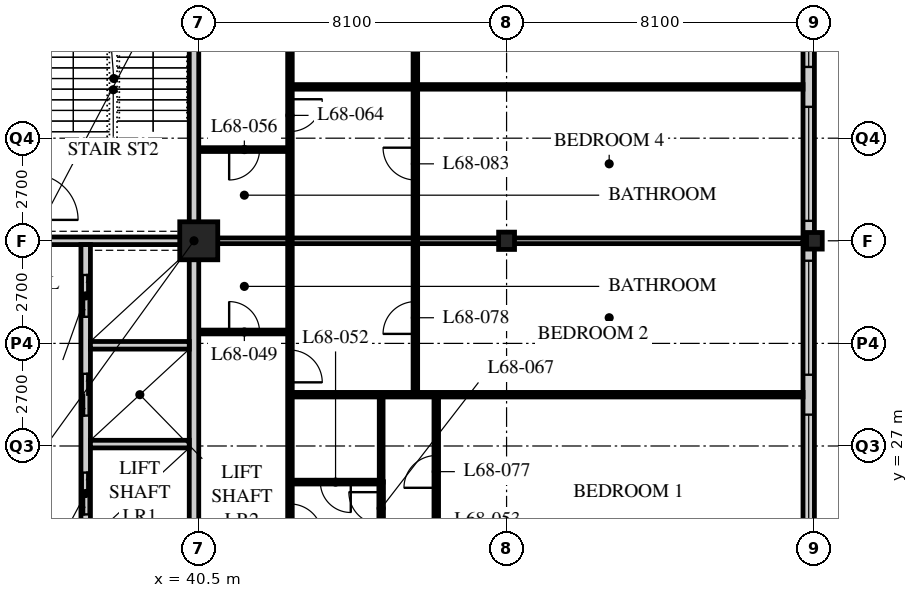
"""IFC4 building model, lengths in metres.
Left out: names, types, materials, properties, quantities, classifications, styles, units other than length and angle.
Written with IfcOpenShell. Run it as: python <this file> out.ifc"""

import sys

from ifc_helpers import new_model, si_unit, direction, frame, frame_2d, origin, origin_2d, place, context, subcontext, project, spatial, rectangle, hollow_rectangle, i_section, extrude, element, fill, save


model = new_model("IFC4")
c1 = context("Model", 3, precision=1e-05, world=origin(), true_north=direction((0.0, 1.0)))
c2 = subcontext(c1, "Body", "Model", "MODEL_VIEW")
j1 = project(units=[si_unit("LENGTHUNIT", "METRE"), si_unit("PLANEANGLEUNIT", "RADIAN")], contexts=[c1])
p1 = place(None, origin())
s1 = spatial("IfcSite", under=j1, at=p1, CompositionType="ELEMENT")
p2 = place(p1, origin())
s2 = spatial("IfcBuilding", under=s1, at=p2, CompositionType="ELEMENT")
p3 = place(p2, frame((0.0, 0.0, 265.8)))
s3 = spatial("IfcBuildingStorey", under=s2, at=p3, CompositionType="ELEMENT", Elevation=265.8)
p4 = place(p3, frame((40.5, 32.4, 0.0), z_axis=(0.0, 0.0, 1.0), x_axis=(1.0, 0.0, 0.0)))
e1 = element("IfcColumn", 1, at=p4, inside=s3, PredefinedType="COLUMN", context=c2, shape_type="SweptSolid", body=[
    extrude(hollow_rectangle(XDim=1.0, YDim=1.0, WallThickness=0.1, at=origin_2d()), origin(), (0.0, 0.0, 1.0), 3.9),
])
p5 = place(p3, frame((48.6, 32.4, 0.0), z_axis=(0.0, 0.0, 1.0), x_axis=(1.0, 0.0, 0.0)))
e2 = element("IfcColumn", 2, at=p5, inside=s3, PredefinedType="COLUMN", context=c2, shape_type="SweptSolid", body=[
    extrude(i_section(OverallWidth=0.418, OverallDepth=0.456, WebThickness=0.042, FlangeThickness=0.067, FilletRadius=0.015, at=origin_2d()), origin(), (0.0, 0.0, 1.0), 3.9),
])
p6 = place(p3, frame((56.7, 32.4, 0.0), z_axis=(0.0, 0.0, 1.0), x_axis=(1.0, 0.0, 0.0)))
e3 = element("IfcColumn", 3, at=p6, inside=s3, PredefinedType="COLUMN", context=c2, shape_type="SweptSolid", body=[
    extrude(i_section(OverallWidth=0.412, OverallDepth=0.437, WebThickness=0.036, FlangeThickness=0.058, FilletRadius=0.015, at=origin_2d()), origin(), (0.0, 0.0, 1.0), 3.9),
])
p7 = place(p3, frame((56.55, 24.6, 0.0), z_axis=(0.0, 0.0, 1.0), x_axis=(0.0, 1.0, 0.0)))
e4 = element("IfcWall", 4, at=p7, inside=s3, PredefinedType="SOLIDWALL", context=c2, shape_type="SweptSolid", body=[
    extrude(rectangle(XDim=32.1, YDim=0.3, at=frame_2d((16.05, 0.0))), origin(), (0.0, 0.0, 1.0), 3.69),
])
p8 = place(p7, frame((0.225, 0.0, 0.6)))
e5 = element("IfcOpeningElement", 5, at=p8, cuts=e4, PredefinedType="OPENING", context=c2, shape_type="SweptSolid", body=[
    extrude(rectangle(XDim=3.0, YDim=2.4, at=frame_2d((1.5, 1.2))), frame((0.0, 0.16, 0.0), z_axis=(0.0, -1.0, 0.0), x_axis=(1.0, 0.0, 0.0)), (0.0, 0.0, 1.0), 0.32),
])
p9 = place(p7, frame((4.275, 0.0, 0.6)))
e6 = element("IfcOpeningElement", 6, at=p9, cuts=e4, PredefinedType="OPENING", context=c2, shape_type="SweptSolid", body=[
    extrude(rectangle(XDim=3.0, YDim=2.4, at=frame_2d((1.5, 1.2))), frame((0.0, 0.16, 0.0), z_axis=(0.0, -1.0, 0.0), x_axis=(1.0, 0.0, 0.0)), (0.0, 0.0, 1.0), 0.32),
])
p10 = place(p7, frame((8.325, 0.0, 0.6)))
e7 = element("IfcOpeningElement", 7, at=p10, cuts=e4, PredefinedType="OPENING", context=c2, shape_type="SweptSolid", body=[
    extrude(rectangle(XDim=3.0, YDim=2.4, at=frame_2d((1.5, 1.2))), frame((0.0, 0.16, 0.0), z_axis=(0.0, -1.0, 0.0), x_axis=(1.0, 0.0, 0.0)), (0.0, 0.0, 1.0), 0.32),
])
p11 = place(p7, frame((12.375, 0.0, 0.6)))
e8 = element("IfcOpeningElement", 8, at=p11, cuts=e4, PredefinedType="OPENING", context=c2, shape_type="SweptSolid", body=[
    extrude(rectangle(XDim=3.0, YDim=2.4, at=frame_2d((1.5, 1.2))), frame((0.0, 0.16, 0.0), z_axis=(0.0, -1.0, 0.0), x_axis=(1.0, 0.0, 0.0)), (0.0, 0.0, 1.0), 0.32),
])
p12 = place(p7, frame((16.425, 0.0, 0.6)))
e9 = element("IfcOpeningElement", 9, at=p12, cuts=e4, PredefinedType="OPENING", context=c2, shape_type="SweptSolid", body=[
    extrude(rectangle(XDim=3.0, YDim=2.4, at=frame_2d((1.5, 1.2))), frame((0.0, 0.16, 0.0), z_axis=(0.0, -1.0, 0.0), x_axis=(1.0, 0.0, 0.0)), (0.0, 0.0, 1.0), 0.32),
])
p13 = place(p7, frame((20.475, 0.0, 0.6)))
e10 = element("IfcOpeningElement", 10, at=p13, cuts=e4, PredefinedType="OPENING", context=c2, shape_type="SweptSolid", body=[
    extrude(rectangle(XDim=3.0, YDim=2.4, at=frame_2d((1.5, 1.2))), frame((0.0, 0.16, 0.0), z_axis=(0.0, -1.0, 0.0), x_axis=(1.0, 0.0, 0.0)), (0.0, 0.0, 1.0), 0.32),
])
p14 = place(p7, frame((24.525, 0.0, 0.6)))
e11 = element("IfcOpeningElement", 11, at=p14, cuts=e4, PredefinedType="OPENING", context=c2, shape_type="SweptSolid", body=[
    extrude(rectangle(XDim=3.0, YDim=2.4, at=frame_2d((1.5, 1.2))), frame((0.0, 0.16, 0.0), z_axis=(0.0, -1.0, 0.0), x_axis=(1.0, 0.0, 0.0)), (0.0, 0.0, 1.0), 0.32),
])
p15 = place(p7, frame((28.575, 0.0, 0.6)))
e12 = element("IfcOpeningElement", 12, at=p15, cuts=e4, PredefinedType="OPENING", context=c2, shape_type="SweptSolid", body=[
    extrude(rectangle(XDim=3.0, YDim=2.4, at=frame_2d((1.5, 1.2))), frame((0.0, 0.16, 0.0), z_axis=(0.0, -1.0, 0.0), x_axis=(1.0, 0.0, 0.0)), (0.0, 0.0, 1.0), 0.32),
])
p16 = place(p3, frame((40.5, 30.0, 0.0), z_axis=(0.0, 0.0, 1.0), x_axis=(1.0, 0.0, 0.0)))
e13 = element("IfcWall", 13, at=p16, inside=s3, PredefinedType="PARTITIONING", context=c2, shape_type="SweptSolid", body=[
    extrude(rectangle(XDim=2.4, YDim=0.1, at=frame_2d((1.2, 0.0))), origin(), (0.0, 0.0, 1.0), 3.69),
])
p17 = place(p16, frame((0.8, 0.0, 0.0)))
e14 = element("IfcOpeningElement", 14, at=p17, cuts=e13, PredefinedType="OPENING", context=c2, shape_type="SweptSolid", body=[
    extrude(rectangle(XDim=0.8, YDim=2.1, at=frame_2d((0.4, 1.05))), frame((0.0, 0.06, 0.0), z_axis=(0.0, -1.0, 0.0), x_axis=(1.0, 0.0, 0.0)), (0.0, 0.0, 1.0), 0.12),
])
p18 = place(p3, frame((42.9, 22.5, 0.0), z_axis=(0.0, 0.0, 1.0), x_axis=(0.0, 1.0, 0.0)))
e15 = element("IfcWall", 15, at=p18, inside=s3, PredefinedType="PARTITIONING", context=c2, shape_type="SweptSolid", body=[
    extrude(rectangle(XDim=9.9, YDim=0.12, at=frame_2d((4.95, 0.0))), origin(), (0.0, 0.0, 1.0), 3.69),
])
p19 = place(p18, frame((2.125, 0.0, 0.0)))
e16 = element("IfcOpeningElement", 16, at=p19, cuts=e15, PredefinedType="OPENING", context=c2, shape_type="SweptSolid", body=[
    extrude(rectangle(XDim=0.85, YDim=2.1, at=frame_2d((0.425, 1.05))), frame((0.0, 0.07, 0.0), z_axis=(0.0, -1.0, 0.0), x_axis=(1.0, 0.0, 0.0)), (0.0, 0.0, 1.0), 0.14),
])
p20 = place(p18, frame((6.175, 0.0, 0.0)))
e17 = element("IfcOpeningElement", 17, at=p20, cuts=e15, PredefinedType="OPENING", context=c2, shape_type="SweptSolid", body=[
    extrude(rectangle(XDim=0.85, YDim=2.1, at=frame_2d((0.425, 1.05))), frame((0.0, 0.07, 0.0), z_axis=(0.0, -1.0, 0.0), x_axis=(1.0, 0.0, 0.0)), (0.0, 0.0, 1.0), 0.14),
])
p21 = place(p3, frame((40.5, 32.4, 0.0), z_axis=(0.0, 0.0, 1.0), x_axis=(1.0, 0.0, 0.0)))
e18 = element("IfcWall", 18, at=p21, inside=s3, PredefinedType="PARTITIONING", context=c2, shape_type="SweptSolid", body=[
    extrude(rectangle(XDim=15.9, YDim=0.15, at=frame_2d((7.95, 0.0))), origin(), (0.0, 0.0, 1.0), 3.078),
])
p22 = place(p3, frame((42.9, 26.05, 0.0), z_axis=(0.0, 0.0, 1.0), x_axis=(1.0, 0.0, 0.0)))
e19 = element("IfcWall", 19, at=p22, inside=s3, PredefinedType="PARTITIONING", context=c2, shape_type="SweptSolid", body=[
    extrude(rectangle(XDim=2.4, YDim=0.1, at=frame_2d((1.2, 0.0))), origin(), (0.0, 0.0, 1.0), 3.69),
])
p23 = place(p22, frame((0.8, 0.0, 0.0)))
e20 = element("IfcOpeningElement", 20, at=p23, cuts=e19, PredefinedType="OPENING", context=c2, shape_type="SweptSolid", body=[
    extrude(rectangle(XDim=0.8, YDim=2.1, at=frame_2d((0.4, 1.05))), frame((0.0, 0.06, 0.0), z_axis=(0.0, -1.0, 0.0), x_axis=(1.0, 0.0, 0.0)), (0.0, 0.0, 1.0), 0.12),
])
p24 = place(p3, frame((45.3, 26.05, 0.0), z_axis=(0.0, 0.0, 1.0), x_axis=(0.0, 1.0, 0.0)))
e21 = element("IfcWall", 21, at=p24, inside=s3, PredefinedType="PARTITIONING", context=c2, shape_type="SweptSolid", body=[
    extrude(rectangle(XDim=2.3, YDim=0.1, at=frame_2d((1.15, 0.0))), origin(), (0.0, 0.0, 1.0), 3.69),
])
p25 = place(p3, frame((42.9, 28.35, 0.0), z_axis=(0.0, 0.0, 1.0), x_axis=(1.0, 0.0, 0.0)))
e22 = element("IfcWall", 22, at=p25, inside=s3, PredefinedType="PARTITIONING", context=c2, shape_type="SweptSolid", body=[
    extrude(rectangle(XDim=13.5, YDim=0.12, at=frame_2d((6.75, 0.0))), origin(), (0.0, 0.0, 1.0), 3.69),
])
p26 = place(p3, frame((40.5, 34.8, 0.0), z_axis=(0.0, 0.0, 1.0), x_axis=(1.0, 0.0, 0.0)))
e23 = element("IfcWall", 23, at=p26, inside=s3, PredefinedType="PARTITIONING", context=c2, shape_type="SweptSolid", body=[
    extrude(rectangle(XDim=2.4, YDim=0.1, at=frame_2d((1.2, 0.0))), origin(), (0.0, 0.0, 1.0), 3.69),
])
p27 = place(p26, frame((0.8, 0.0, 0.0)))
e24 = element("IfcOpeningElement", 24, at=p27, cuts=e23, PredefinedType="OPENING", context=c2, shape_type="SweptSolid", body=[
    extrude(rectangle(XDim=0.8, YDim=2.1, at=frame_2d((0.4, 1.05))), frame((0.0, 0.06, 0.0), z_axis=(0.0, -1.0, 0.0), x_axis=(1.0, 0.0, 0.0)), (0.0, 0.0, 1.0), 0.12),
])
p28 = place(p3, frame((42.9, 48.6, 0.0), z_axis=(0.0, 0.0, 1.0), x_axis=(0.0, -1.0, 0.0)))
e25 = element("IfcWall", 25, at=p28, inside=s3, PredefinedType="PARTITIONING", context=c2, shape_type="SweptSolid", body=[
    extrude(rectangle(XDim=16.2, YDim=0.12, at=frame_2d((8.1, 0.0))), origin(), (0.0, 0.0, 1.0), 3.69),
])
p29 = place(p28, frame((2.125, 0.0, 0.0)))
e26 = element("IfcOpeningElement", 26, at=p29, cuts=e25, PredefinedType="OPENING", context=c2, shape_type="SweptSolid", body=[
    extrude(rectangle(XDim=0.85, YDim=2.1, at=frame_2d((0.425, 1.05))), frame((0.0, 0.07, 0.0), z_axis=(0.0, -1.0, 0.0), x_axis=(1.0, 0.0, 0.0)), (0.0, 0.0, 1.0), 0.14),
])
p30 = place(p28, frame((8.425, 0.0, 0.0)))
e27 = element("IfcOpeningElement", 27, at=p30, cuts=e25, PredefinedType="OPENING", context=c2, shape_type="SweptSolid", body=[
    extrude(rectangle(XDim=0.85, YDim=2.1, at=frame_2d((0.425, 1.05))), frame((0.0, 0.07, 0.0), z_axis=(0.0, -1.0, 0.0), x_axis=(1.0, 0.0, 0.0)), (0.0, 0.0, 1.0), 0.14),
])
p31 = place(p28, frame((12.475, 0.0, 0.0)))
e28 = element("IfcOpeningElement", 28, at=p31, cuts=e25, PredefinedType="OPENING", context=c2, shape_type="SweptSolid", body=[
    extrude(rectangle(XDim=0.85, YDim=2.1, at=frame_2d((0.425, 1.05))), frame((0.0, 0.07, 0.0), z_axis=(0.0, -1.0, 0.0), x_axis=(1.0, 0.0, 0.0)), (0.0, 0.0, 1.0), 0.14),
])
p32 = place(p3, frame((42.9, 36.45, 0.0), z_axis=(0.0, 0.0, 1.0), x_axis=(1.0, 0.0, 0.0)))
e29 = element("IfcWall", 29, at=p32, inside=s3, PredefinedType="PARTITIONING", context=c2, shape_type="SweptSolid", body=[
    extrude(rectangle(XDim=13.5, YDim=0.12, at=frame_2d((6.75, 0.0))), origin(), (0.0, 0.0, 1.0), 3.69),
])
p33 = place(p3, frame((45.3, 24.3, 0.0), z_axis=(0.0, 0.0, 1.0), x_axis=(0.0, 1.0, 0.0)))
e30 = element("IfcWall", 30, at=p33, inside=s3, PredefinedType="PARTITIONING", context=c2, shape_type="SweptSolid", body=[
    extrude(rectangle(XDim=1.76, YDim=0.12, at=frame_2d((0.88, 0.0))), origin(), (0.0, 0.0, 1.0), 3.69),
])
p34 = place(p33, frame((0.635, 0.0, 0.0)))
e31 = element("IfcOpeningElement", 31, at=p34, cuts=e30, PredefinedType="OPENING", context=c2, shape_type="SweptSolid", body=[
    extrude(rectangle(XDim=0.85, YDim=2.1, at=frame_2d((0.425, 1.05))), frame((0.0, 0.07, 0.0), z_axis=(0.0, -1.0, 0.0), x_axis=(1.0, 0.0, 0.0)), (0.0, 0.0, 1.0), 0.14),
])
p35 = place(p3, frame((46.75, 24.3, 0.0), z_axis=(0.0, 0.0, 1.0), x_axis=(0.0, 1.0, 0.0)))
e32 = element("IfcWall", 32, at=p35, inside=s3, PredefinedType="PARTITIONING", context=c2, shape_type="SweptSolid", body=[
    extrude(rectangle(XDim=4.05, YDim=0.12, at=frame_2d((2.025, 0.0))), origin(), (0.0, 0.0, 1.0), 3.69),
])
p36 = place(p35, frame((1.6, 0.0, 0.0)))
e33 = element("IfcOpeningElement", 33, at=p36, cuts=e32, PredefinedType="OPENING", context=c2, shape_type="SweptSolid", body=[
    extrude(rectangle(XDim=0.85, YDim=2.1, at=frame_2d((0.425, 1.05))), frame((0.0, 0.07, 0.0), z_axis=(0.0, -1.0, 0.0), x_axis=(1.0, 0.0, 0.0)), (0.0, 0.0, 1.0), 0.14),
])
p37 = place(p3, frame((46.2, 28.35, 0.0), z_axis=(0.0, 0.0, 1.0), x_axis=(0.0, 1.0, 0.0)))
e34 = element("IfcWall", 34, at=p37, inside=s3, PredefinedType="PARTITIONING", context=c2, shape_type="SweptSolid", body=[
    extrude(rectangle(XDim=12.15, YDim=0.12, at=frame_2d((6.075, 0.0))), origin(), (0.0, 0.0, 1.0), 3.69),
])
p38 = place(p37, frame((1.6, 0.0, 0.0)))
e35 = element("IfcOpeningElement", 35, at=p38, cuts=e34, PredefinedType="OPENING", context=c2, shape_type="SweptSolid", body=[
    extrude(rectangle(XDim=0.85, YDim=2.1, at=frame_2d((0.425, 1.05))), frame((0.0, 0.07, 0.0), z_axis=(0.0, -1.0, 0.0), x_axis=(1.0, 0.0, 0.0)), (0.0, 0.0, 1.0), 0.14),
])
p39 = place(p37, frame((9.7, 0.0, 0.0)))
e36 = element("IfcOpeningElement", 36, at=p39, cuts=e34, PredefinedType="OPENING", context=c2, shape_type="SweptSolid", body=[
    extrude(rectangle(XDim=0.85, YDim=2.1, at=frame_2d((0.425, 1.05))), frame((0.0, 0.07, 0.0), z_axis=(0.0, -1.0, 0.0), x_axis=(1.0, 0.0, 0.0)), (0.0, 0.0, 1.0), 0.14),
])
p40 = place(p37, frame((5.65, 0.0, 0.0)))
e37 = element("IfcOpeningElement", 37, at=p40, cuts=e34, PredefinedType="OPENING", context=c2, shape_type="SweptSolid", body=[
    extrude(rectangle(XDim=0.85, YDim=2.1, at=frame_2d((0.425, 1.05))), frame((0.0, 0.07, 0.0), z_axis=(0.0, -1.0, 0.0), x_axis=(1.0, 0.0, 0.0)), (0.0, 0.0, 1.0), 0.14),
])
p41 = place(p3, frame((40.375, 24.55, 0.0), z_axis=(0.0, 0.0, 1.0), x_axis=(0.0, 1.0, 0.0)))
e38 = element("IfcWall", 38, at=p41, inside=s3, PredefinedType="SOLIDWALL", context=c2, shape_type="SweptSolid", body=[
    extrude(rectangle(XDim=15.7, YDim=0.25, at=frame_2d((7.85, 0.0))), origin(), (0.0, 0.0, 1.0), 3.078),
])
p42 = place(p3, frame((32.3, 32.4, 0.0), z_axis=(0.0, 0.0, 1.0), x_axis=(1.0, 0.0, 0.0)))
e39 = element("IfcWall", 39, at=p42, inside=s3, PredefinedType="SOLIDWALL", context=c2, shape_type="SweptSolid", body=[
    extrude(rectangle(XDim=7.95, YDim=0.2, at=frame_2d((3.975, 0.0))), origin(), (0.0, 0.0, 1.0), 3.078),
])
p43 = place(p3, frame((37.525, 24.55, 0.0), z_axis=(0.0, 0.0, 1.0), x_axis=(0.0, 1.0, 0.0)))
e40 = element("IfcWall", 40, at=p43, inside=s3, PredefinedType="SOLIDWALL", context=c2, shape_type="SweptSolid", body=[
    extrude(rectangle(XDim=7.75, YDim=0.25, at=frame_2d((3.875, 0.0))), origin(), (0.0, 0.0, 1.0), 3.69),
])
p44 = place(p43, frame((0.65, 0.0, 0.0)))
e41 = element("IfcOpeningElement", 41, at=p44, cuts=e40, PredefinedType="OPENING", context=c2, shape_type="SweptSolid", body=[
    extrude(rectangle(XDim=1.1, YDim=2.4, at=frame_2d((0.55, 1.2))), frame((0.0, 0.135, 0.0), z_axis=(0.0, -1.0, 0.0), x_axis=(1.0, 0.0, 0.0)), (0.0, 0.0, 1.0), 0.27),
])
p45 = place(p43, frame((3.25, 0.0, 0.0)))
e42 = element("IfcOpeningElement", 42, at=p45, cuts=e40, PredefinedType="OPENING", context=c2, shape_type="SweptSolid", body=[
    extrude(rectangle(XDim=1.1, YDim=2.4, at=frame_2d((0.55, 1.2))), frame((0.0, 0.135, 0.0), z_axis=(0.0, -1.0, 0.0), x_axis=(1.0, 0.0, 0.0)), (0.0, 0.0, 1.0), 0.27),
])
p46 = place(p43, frame((5.85, 0.0, 0.0)))
e43 = element("IfcOpeningElement", 43, at=p46, cuts=e40, PredefinedType="OPENING", context=c2, shape_type="SweptSolid", body=[
    extrude(rectangle(XDim=1.1, YDim=2.4, at=frame_2d((0.55, 1.2))), frame((0.0, 0.135, 0.0), z_axis=(0.0, -1.0, 0.0), x_axis=(1.0, 0.0, 0.0)), (0.0, 0.0, 1.0), 0.27),
])
for number, where, z_axis, x_axis in (
    (44, (37.65, 27.05, 0.0), (0.0, 0.0, 1.0), (1.0, 0.0, 0.0)),
    (45, (37.65, 29.65, 0.0), (0.0, 0.0, 1.0), (1.0, 0.0, 0.0)),
):
    element("IfcWall", number, at=place(p3, frame(where, z_axis=z_axis, x_axis=x_axis)), inside=s3, PredefinedType="SOLIDWALL", context=c2, shape_type="SweptSolid", body=[
        extrude(rectangle(XDim=2.6, YDim=0.2, at=frame_2d((1.3, 0.0))), origin(), (0.0, 0.0, 1.0), 3.69),
    ])
p47 = place(p8, origin())
e46 = element("IfcWindow", 46, at=p47, inside=s3, PartitioningType="SINGLE_PANEL", PredefinedType="WINDOW", context=c2, shape_type="SweptSolid", body=[
    extrude(rectangle(XDim=3.0, YDim=2.4, at=frame_2d((1.5, 1.2))), frame((0.0, 0.03, 0.0), z_axis=(0.0, -1.0, 0.0), x_axis=(1.0, 0.0, 0.0)), (0.0, 0.0, 1.0), 0.06),
])
fill(e5, e46)
p48 = place(p9, origin())
e47 = element("IfcWindow", 47, at=p48, inside=s3, PartitioningType="SINGLE_PANEL", PredefinedType="WINDOW", context=c2, shape_type="SweptSolid", body=[
    extrude(rectangle(XDim=3.0, YDim=2.4, at=frame_2d((1.5, 1.2))), frame((0.0, 0.03, 0.0), z_axis=(0.0, -1.0, 0.0), x_axis=(1.0, 0.0, 0.0)), (0.0, 0.0, 1.0), 0.06),
])
fill(e6, e47)
p49 = place(p10, origin())
e48 = element("IfcWindow", 48, at=p49, inside=s3, PartitioningType="SINGLE_PANEL", PredefinedType="WINDOW", context=c2, shape_type="SweptSolid", body=[
    extrude(rectangle(XDim=3.0, YDim=2.4, at=frame_2d((1.5, 1.2))), frame((0.0, 0.03, 0.0), z_axis=(0.0, -1.0, 0.0), x_axis=(1.0, 0.0, 0.0)), (0.0, 0.0, 1.0), 0.06),
])
fill(e7, e48)
p50 = place(p11, origin())
e49 = element("IfcWindow", 49, at=p50, inside=s3, PartitioningType="SINGLE_PANEL", PredefinedType="WINDOW", context=c2, shape_type="SweptSolid", body=[
    extrude(rectangle(XDim=3.0, YDim=2.4, at=frame_2d((1.5, 1.2))), frame((0.0, 0.03, 0.0), z_axis=(0.0, -1.0, 0.0), x_axis=(1.0, 0.0, 0.0)), (0.0, 0.0, 1.0), 0.06),
])
fill(e8, e49)
p51 = place(p17, origin())
e50 = element("IfcDoor", 50, at=p51, inside=s3, OperationType="SINGLE_SWING_LEFT", PredefinedType="DOOR", context=c2, shape_type="SweptSolid", body=[
    extrude(rectangle(XDim=0.8, YDim=2.1, at=frame_2d((0.4, 1.05))), frame((0.0, 0.025, 0.0), z_axis=(0.0, -1.0, 0.0), x_axis=(1.0, 0.0, 0.0)), (0.0, 0.0, 1.0), 0.05),
])
fill(e14, e50)
p52 = place(p23, origin())
e51 = element("IfcDoor", 51, at=p52, inside=s3, OperationType="SINGLE_SWING_LEFT", PredefinedType="DOOR", context=c2, shape_type="SweptSolid", body=[
    extrude(rectangle(XDim=0.8, YDim=2.1, at=frame_2d((0.4, 1.05))), frame((0.0, 0.025, 0.0), z_axis=(0.0, -1.0, 0.0), x_axis=(1.0, 0.0, 0.0)), (0.0, 0.0, 1.0), 0.05),
])
fill(e20, e51)
p53 = place(p19, origin())
e52 = element("IfcDoor", 52, at=p53, inside=s3, OperationType="SINGLE_SWING_RIGHT", PredefinedType="DOOR", context=c2, shape_type="SweptSolid", body=[
    extrude(rectangle(XDim=0.85, YDim=2.1, at=frame_2d((0.425, 1.05))), frame((0.0, 0.025, 0.0), z_axis=(0.0, -1.0, 0.0), x_axis=(1.0, 0.0, 0.0)), (0.0, 0.0, 1.0), 0.05),
])
fill(e16, e52)
p54 = place(p20, origin())
e53 = element("IfcDoor", 53, at=p54, inside=s3, OperationType="SINGLE_SWING_RIGHT", PredefinedType="DOOR", context=c2, shape_type="SweptSolid", body=[
    extrude(rectangle(XDim=0.85, YDim=2.1, at=frame_2d((0.425, 1.05))), frame((0.0, 0.025, 0.0), z_axis=(0.0, -1.0, 0.0), x_axis=(1.0, 0.0, 0.0)), (0.0, 0.0, 1.0), 0.05),
])
fill(e17, e53)
p55 = place(p27, origin())
e54 = element("IfcDoor", 54, at=p55, inside=s3, OperationType="SINGLE_SWING_RIGHT", PredefinedType="DOOR", context=c2, shape_type="SweptSolid", body=[
    extrude(rectangle(XDim=0.8, YDim=2.1, at=frame_2d((0.4, 1.05))), frame((0.0, 0.025, 0.0), z_axis=(0.0, -1.0, 0.0), x_axis=(1.0, 0.0, 0.0)), (0.0, 0.0, 1.0), 0.05),
])
fill(e24, e54)
p56 = place(p31, origin())
e55 = element("IfcDoor", 55, at=p56, inside=s3, OperationType="SINGLE_SWING_LEFT", PredefinedType="DOOR", context=c2, shape_type="SweptSolid", body=[
    extrude(rectangle(XDim=0.85, YDim=2.1, at=frame_2d((0.425, 1.05))), frame((0.0, 0.025, 0.0), z_axis=(0.0, -1.0, 0.0), x_axis=(1.0, 0.0, 0.0)), (0.0, 0.0, 1.0), 0.05),
])
fill(e28, e55)
p57 = place(p34, origin())
e56 = element("IfcDoor", 56, at=p57, inside=s3, OperationType="SINGLE_SWING_RIGHT", PredefinedType="DOOR", context=c2, shape_type="SweptSolid", body=[
    extrude(rectangle(XDim=0.85, YDim=2.1, at=frame_2d((0.425, 1.05))), frame((0.0, 0.025, 0.0), z_axis=(0.0, -1.0, 0.0), x_axis=(1.0, 0.0, 0.0)), (0.0, 0.0, 1.0), 0.05),
])
fill(e31, e56)
p58 = place(p36, origin())
e57 = element("IfcDoor", 57, at=p58, inside=s3, OperationType="SINGLE_SWING_LEFT", PredefinedType="DOOR", context=c2, shape_type="SweptSolid", body=[
    extrude(rectangle(XDim=0.85, YDim=2.1, at=frame_2d((0.425, 1.05))), frame((0.0, 0.025, 0.0), z_axis=(0.0, -1.0, 0.0), x_axis=(1.0, 0.0, 0.0)), (0.0, 0.0, 1.0), 0.05),
])
fill(e33, e57)
p59 = place(p38, origin())
e58 = element("IfcDoor", 58, at=p59, inside=s3, OperationType="SINGLE_SWING_LEFT", PredefinedType="DOOR", context=c2, shape_type="SweptSolid", body=[
    extrude(rectangle(XDim=0.85, YDim=2.1, at=frame_2d((0.425, 1.05))), frame((0.0, 0.025, 0.0), z_axis=(0.0, -1.0, 0.0), x_axis=(1.0, 0.0, 0.0)), (0.0, 0.0, 1.0), 0.05),
])
fill(e35, e58)
p60 = place(p40, origin())
e59 = element("IfcDoor", 59, at=p60, inside=s3, OperationType="SINGLE_SWING_RIGHT", PredefinedType="DOOR", context=c2, shape_type="SweptSolid", body=[
    extrude(rectangle(XDim=0.85, YDim=2.1, at=frame_2d((0.425, 1.05))), frame((0.0, 0.025, 0.0), z_axis=(0.0, -1.0, 0.0), x_axis=(1.0, 0.0, 0.0)), (0.0, 0.0, 1.0), 0.05),
])
fill(e37, e59)
p61 = place(p44, origin())
e60 = element("IfcDoor", 60, at=p61, inside=s3, OperationType="DOUBLE_DOOR_SLIDING", PredefinedType="DOOR", context=c2, shape_type="SweptSolid", body=[
    extrude(rectangle(XDim=1.1, YDim=2.4, at=frame_2d((0.55, 1.2))), frame((0.0, 0.025, 0.0), z_axis=(0.0, -1.0, 0.0), x_axis=(1.0, 0.0, 0.0)), (0.0, 0.0, 1.0), 0.05),
])
fill(e41, e60)
p62 = place(p45, origin())
e61 = element("IfcDoor", 61, at=p62, inside=s3, OperationType="DOUBLE_DOOR_SLIDING", PredefinedType="DOOR", context=c2, shape_type="SweptSolid", body=[
    extrude(rectangle(XDim=1.1, YDim=2.4, at=frame_2d((0.55, 1.2))), frame((0.0, 0.025, 0.0), z_axis=(0.0, -1.0, 0.0), x_axis=(1.0, 0.0, 0.0)), (0.0, 0.0, 1.0), 0.05),
])
fill(e42, e61)
p63 = place(p46, origin())
e62 = element("IfcDoor", 62, at=p63, inside=s3, OperationType="DOUBLE_DOOR_SLIDING", PredefinedType="DOOR", context=c2, shape_type="SweptSolid", body=[
    extrude(rectangle(XDim=1.1, YDim=2.4, at=frame_2d((0.55, 1.2))), frame((0.0, 0.025, 0.0), z_axis=(0.0, -1.0, 0.0), x_axis=(1.0, 0.0, 0.0)), (0.0, 0.0, 1.0), 0.05),
])
fill(e43, e62)
save(model, sys.argv[1])
